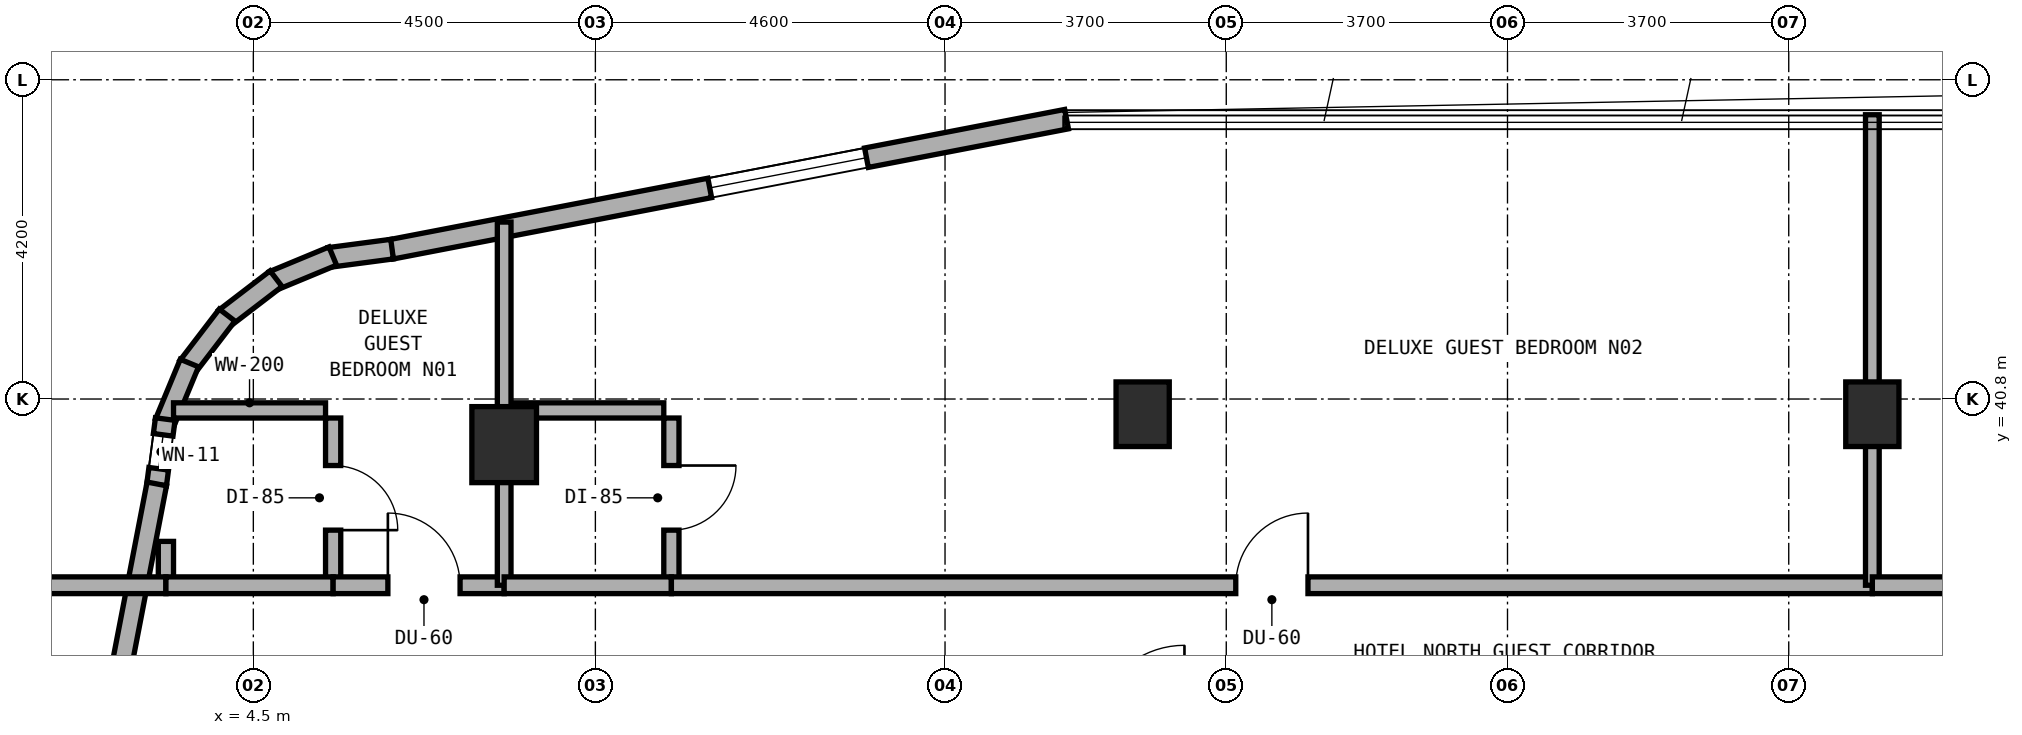
"""IFC4 building model, lengths in metres.
Left out: names, types, materials, properties, quantities, classifications, styles, units other than length and angle.
Written with IfcOpenShell. Run it as: python <this file> out.ifc"""

import sys

from ifc_helpers import new_model, si_unit, direction, frame, frame_2d, origin, origin_2d, place, context, subcontext, project, spatial, rectangle, extrude, element, fill, save


model = new_model("IFC4")
c1 = context("Model", 3, precision=1e-05, world=origin(), true_north=direction((0.0, 1.0)))
c2 = subcontext(c1, "Body", "Model", "MODEL_VIEW")
j1 = project(units=[si_unit("LENGTHUNIT", "METRE"), si_unit("PLANEANGLEUNIT", "RADIAN")], contexts=[c1])
p1 = place(None, origin())
s1 = spatial("IfcSite", under=j1, at=p1, CompositionType="ELEMENT")
p2 = place(p1, origin())
s2 = spatial("IfcBuilding", under=s1, at=p2, CompositionType="ELEMENT")
p3 = place(p2, frame((0.0, 0.0, 195.5)))
s3 = spatial("IfcBuildingStorey", under=s2, at=p3, CompositionType="ELEMENT", Elevation=195.5)
for number, where, z_axis, x_axis in (
    (1, (16.2, 40.6, 0.0), (0.0, 0.0, 1.0), (1.0, 0.0, 0.0)),
    (2, (25.8, 40.6, 0.0), (0.0, 0.0, 1.0), (1.0, 0.0, 0.0)),
):
    element("IfcColumn", number, at=place(p3, frame(where, z_axis=z_axis, x_axis=x_axis)), inside=s3, PredefinedType="COLUMN", context=c2, shape_type="SweptSolid", body=[
        extrude(rectangle(XDim=0.7, YDim=0.85, at=origin_2d()), origin(), (0.0, 0.0, 1.0), 3.6),
    ])
p4 = place(p3, frame((7.8, 40.2, 0.0), z_axis=(0.0, 0.0, 1.0), x_axis=(1.0, 0.0, 0.0)))
e3 = element("IfcColumn", 3, at=p4, inside=s3, PredefinedType="COLUMN", context=c2, shape_type="SweptSolid", body=[
    extrude(rectangle(XDim=0.85, YDim=1.0, at=origin_2d()), origin(), (0.0, 0.0, 1.0), 3.6),
])
p5 = place(p3, frame((15.199, 44.482, 0.0), z_axis=(0.0, 0.0, 1.0), x_axis=(-0.98192801022, -0.189254809039, 0.0)))
e4 = element("IfcWall", 4, at=p5, inside=s3, PredefinedType="STANDARD", context=c2, shape_type="SweptSolid", body=[
    extrude(rectangle(XDim=9.046, YDim=0.26, at=frame_2d((4.523, 0.0))), origin(), (0.0, 0.0, 1.0), 3.28),
])
p6 = place(p5, frame((2.681, 0.0, 0.85)))
e5 = element("IfcOpeningElement", 5, at=p6, cuts=e4, PredefinedType="OPENING", context=c2, shape_type="SweptSolid", body=[
    extrude(rectangle(XDim=2.1, YDim=1.5, at=frame_2d((1.05, 0.75))), frame((0.0, 0.14, 0.0), z_axis=(0.0, -1.0, 0.0), x_axis=(1.0, 0.0, 0.0)), (0.0, 0.0, 1.0), 0.28),
])
p7 = place(p3, frame((6.325, 42.772, 0.0), z_axis=(0.0, 0.0, 1.0), x_axis=(-0.99142134712, -0.130704676564, 0.0)))
e6 = element("IfcWall", 6, at=p7, inside=s3, PredefinedType="STANDARD", context=c2, shape_type="SweptSolid", body=[
    extrude(rectangle(XDim=0.833, YDim=0.26, at=frame_2d((0.417, 0.0))), origin(), (0.0, 0.0, 1.0), 3.28),
])
p8 = place(p3, frame((5.545, 42.681, 0.0), z_axis=(0.0, 0.0, 1.0), x_axis=(-0.923712395518, -0.383086687796, 0.0)))
e7 = element("IfcWall", 7, at=p8, inside=s3, PredefinedType="STANDARD", context=c2, shape_type="SweptSolid", body=[
    extrude(rectangle(XDim=0.851, YDim=0.26, at=frame_2d((0.425, 0.0))), origin(), (0.0, 0.0, 1.0), 3.28),
])
for number, where, z_axis, x_axis in (
    (8, (4.799, 42.383, 0.0), (0.0, 0.0, 1.0), (-0.794, -0.608, 0.0)),
    (9, (4.155, 41.904, 0.0), (0.0, 0.0, 1.0), (-0.608, -0.794, 0.0)),
):
    element("IfcWall", number, at=place(p3, frame(where, z_axis=z_axis, x_axis=x_axis)), inside=s3, PredefinedType="STANDARD", context=c2, shape_type="SweptSolid", body=[
        extrude(rectangle(XDim=0.85, YDim=0.26, at=frame_2d((0.425, 0.0))), origin(), (0.0, 0.0, 1.0), 3.28),
    ])
p9 = place(p3, frame((3.659, 41.273, 0.0), z_axis=(0.0, 0.0, 1.0), x_axis=(-0.383086687796, -0.923712395518, 0.0)))
e10 = element("IfcWall", 10, at=p9, inside=s3, PredefinedType="STANDARD", context=c2, shape_type="SweptSolid", body=[
    extrude(rectangle(XDim=0.851, YDim=0.26, at=frame_2d((0.425, 0.0))), origin(), (0.0, 0.0, 1.0), 3.28),
])
p10 = place(p3, frame((3.341, 40.536, 0.0), z_axis=(0.0, 0.0, 1.0), x_axis=(-0.130192647656, -0.991488716273, 0.0)))
e11 = element("IfcWall", 11, at=p10, inside=s3, PredefinedType="STANDARD", context=c2, shape_type="SweptSolid", body=[
    extrude(rectangle(XDim=0.868, YDim=0.26, at=frame_2d((0.434, 0.0))), origin(), (0.0, 0.0, 1.0), 3.28),
])
p11 = place(p10, frame((0.209, 0.0, 0.85)))
e12 = element("IfcOpeningElement", 12, at=p11, cuts=e11, PredefinedType="OPENING", context=c2, shape_type="SweptSolid", body=[
    extrude(rectangle(XDim=0.45, YDim=1.5, at=frame_2d((0.225, 0.75))), frame((0.0, 0.14, 0.0), z_axis=(0.0, -1.0, 0.0), x_axis=(1.0, 0.0, 0.0)), (0.0, 0.0, 1.0), 0.28),
])
p12 = place(p3, frame((3.23, 39.683, 0.0), z_axis=(0.0, 0.0, 1.0), x_axis=(-0.189254809039, -0.98192801022, 0.0)))
e13 = element("IfcWall", 13, at=p12, inside=s3, PredefinedType="STANDARD", context=c2, shape_type="SweptSolid", body=[
    extrude(rectangle(XDim=9.046, YDim=0.26, at=frame_2d((4.523, 0.0))), origin(), (0.0, 0.0, 1.0), 3.28),
])
p13 = place(p12, frame((4.212, 0.0, 0.85)))
e14 = element("IfcOpeningElement", 14, at=p13, cuts=e13, PredefinedType="OPENING", context=c2, shape_type="SweptSolid", body=[
    extrude(rectangle(XDim=2.1, YDim=1.5, at=frame_2d((1.05, 0.75))), frame((0.0, 0.14, 0.0), z_axis=(0.0, -1.0, 0.0), x_axis=(1.0, 0.0, 0.0)), (0.0, 0.0, 1.0), 0.28),
])
p14 = place(p3, frame((5.55, 38.45, 0.0), z_axis=(0.0, 0.0, 1.0), x_axis=(0.0, 1.0, 0.0)))
e15 = element("IfcWall", 15, at=p14, inside=s3, PredefinedType="PLUMBINGWALL", context=c2, shape_type="SweptSolid", body=[
    extrude(rectangle(XDim=2.1, YDim=0.2, at=frame_2d((1.05, 0.0))), origin(), (0.0, 0.0, 1.0), 3.28),
])
p15 = place(p14, frame((0.625, 0.0, 0.0)))
e16 = element("IfcOpeningElement", 16, at=p15, cuts=e15, PredefinedType="OPENING", context=c2, shape_type="SweptSolid", body=[
    extrude(rectangle(XDim=0.85, YDim=2.1, at=frame_2d((0.425, 1.05))), frame((0.0, 0.11, 0.0), z_axis=(0.0, -1.0, 0.0), x_axis=(1.0, 0.0, 0.0)), (0.0, 0.0, 1.0), 0.22),
])
p16 = place(p3, frame((3.45, 40.65, 0.0), z_axis=(0.0, 0.0, 1.0), x_axis=(1.0, 0.0, 0.0)))
e17 = element("IfcWall", 17, at=p16, inside=s3, PredefinedType="PLUMBINGWALL", context=c2, shape_type="SweptSolid", body=[
    extrude(rectangle(XDim=2.0, YDim=0.2, at=frame_2d((1.0, 0.0))), origin(), (0.0, 0.0, 1.0), 3.28),
])
p17 = place(p3, frame((3.35, 38.35, 0.0), z_axis=(0.0, 0.0, 1.0), x_axis=(0.0, 1.0, 0.0)))
e18 = element("IfcWall", 18, at=p17, inside=s3, PredefinedType="PLUMBINGWALL", context=c2, shape_type="SweptSolid", body=[
    extrude(rectangle(XDim=0.577, YDim=0.2, at=frame_2d((0.289, 0.0))), origin(), (0.0, 0.0, 1.0), 3.28),
])
p18 = place(p3, frame((1.56, 38.35, 0.0), z_axis=(0.0, 0.0, 1.0), x_axis=(1.0, 0.0, 0.0)))
e19 = element("IfcWall", 19, at=p18, inside=s3, PredefinedType="SOLIDWALL", context=c2, shape_type="SweptSolid", body=[
    extrude(rectangle(XDim=1.79, YDim=0.22, at=frame_2d((0.895, 0.0))), origin(), (0.0, 0.0, 1.0), 3.28),
])
p19 = place(p3, frame((3.35, 38.35, 0.0), z_axis=(0.0, 0.0, 1.0), x_axis=(1.0, 0.0, 0.0)))
e20 = element("IfcWall", 20, at=p19, inside=s3, PredefinedType="SOLIDWALL", context=c2, shape_type="SweptSolid", body=[
    extrude(rectangle(XDim=2.2, YDim=0.22, at=frame_2d((1.1, 0.0))), origin(), (0.0, 0.0, 1.0), 3.28),
])
p20 = place(p3, frame((5.55, 38.35, 0.0), z_axis=(0.0, 0.0, 1.0), x_axis=(1.0, 0.0, 0.0)))
e21 = element("IfcWall", 21, at=p20, inside=s3, PredefinedType="SOLIDWALL", context=c2, shape_type="SweptSolid", body=[
    extrude(rectangle(XDim=2.25, YDim=0.22, at=frame_2d((1.125, 0.0))), origin(), (0.0, 0.0, 1.0), 2.955),
])
p21 = place(p20, frame((0.72, 0.0, 0.0)))
e22 = element("IfcOpeningElement", 22, at=p21, cuts=e21, PredefinedType="OPENING", context=c2, shape_type="SweptSolid", body=[
    extrude(rectangle(XDim=0.95, YDim=2.1, at=frame_2d((0.475, 1.05))), frame((0.0, 0.12, 0.0), z_axis=(0.0, -1.0, 0.0), x_axis=(1.0, 0.0, 0.0)), (0.0, 0.0, 1.0), 0.24),
])
p22 = place(p3, frame((7.8, 38.35, 0.0), z_axis=(0.0, 0.0, 1.0), x_axis=(0.0, 1.0, 0.0)))
e23 = element("IfcWall", 23, at=p22, inside=s3, PredefinedType="SOLIDWALL", context=c2, shape_type="SweptSolid", body=[
    extrude(rectangle(XDim=4.778, YDim=0.18, at=frame_2d((2.389, 0.0))), origin(), (0.0, 0.0, 1.0), 2.895),
])
p23 = place(p3, frame((10.0, 38.45, 0.0), z_axis=(0.0, 0.0, 1.0), x_axis=(0.0, 1.0, 0.0)))
e24 = element("IfcWall", 24, at=p23, inside=s3, PredefinedType="PLUMBINGWALL", context=c2, shape_type="SweptSolid", body=[
    extrude(rectangle(XDim=2.1, YDim=0.2, at=frame_2d((1.05, 0.0))), origin(), (0.0, 0.0, 1.0), 2.895),
])
p24 = place(p23, frame((0.625, 0.0, 0.0)))
e25 = element("IfcOpeningElement", 25, at=p24, cuts=e24, PredefinedType="OPENING", context=c2, shape_type="SweptSolid", body=[
    extrude(rectangle(XDim=0.85, YDim=2.1, at=frame_2d((0.425, 1.05))), frame((0.0, 0.11, 0.0), z_axis=(0.0, -1.0, 0.0), x_axis=(1.0, 0.0, 0.0)), (0.0, 0.0, 1.0), 0.22),
])
p25 = place(p3, frame((7.9, 40.65, 0.0), z_axis=(0.0, 0.0, 1.0), x_axis=(1.0, 0.0, 0.0)))
e26 = element("IfcWall", 26, at=p25, inside=s3, PredefinedType="PLUMBINGWALL", context=c2, shape_type="SweptSolid", body=[
    extrude(rectangle(XDim=2.0, YDim=0.2, at=frame_2d((1.0, 0.0))), origin(), (0.0, 0.0, 1.0), 3.28),
])
p26 = place(p3, frame((7.8, 38.35, 0.0), z_axis=(0.0, 0.0, 1.0), x_axis=(1.0, 0.0, 0.0)))
e27 = element("IfcWall", 27, at=p26, inside=s3, PredefinedType="SOLIDWALL", context=c2, shape_type="SweptSolid", body=[
    extrude(rectangle(XDim=2.2, YDim=0.22, at=frame_2d((1.1, 0.0))), origin(), (0.0, 0.0, 1.0), 2.955),
])
p27 = place(p3, frame((10.0, 38.35, 0.0), z_axis=(0.0, 0.0, 1.0), x_axis=(1.0, 0.0, 0.0)))
e28 = element("IfcWall", 28, at=p27, inside=s3, PredefinedType="SOLIDWALL", context=c2, shape_type="SweptSolid", body=[
    extrude(rectangle(XDim=15.8, YDim=0.22, at=frame_2d((7.9, 0.0))), origin(), (0.0, 0.0, 1.0), 2.955),
])
p28 = place(p27, frame((7.425, 0.0, 0.0)))
e29 = element("IfcOpeningElement", 29, at=p28, cuts=e28, PredefinedType="OPENING", context=c2, shape_type="SweptSolid", body=[
    extrude(rectangle(XDim=0.95, YDim=2.1, at=frame_2d((0.475, 1.05))), frame((0.0, 0.12, 0.0), z_axis=(0.0, -1.0, 0.0), x_axis=(1.0, 0.0, 0.0)), (0.0, 0.0, 1.0), 0.24),
])
p29 = place(p3, frame((25.8, 38.35, 0.0), z_axis=(0.0, 0.0, 1.0), x_axis=(0.0, 1.0, 0.0)))
e30 = element("IfcWall", 30, at=p29, inside=s3, PredefinedType="SOLIDWALL", context=c2, shape_type="SweptSolid", body=[
    extrude(rectangle(XDim=6.19, YDim=0.18, at=frame_2d((3.095, 0.0))), origin(), (0.0, 0.0, 1.0), 2.895),
])
p30 = place(p3, frame((25.8, 38.35, 0.0), z_axis=(0.0, 0.0, 1.0), x_axis=(1.0, 0.0, 0.0)))
e31 = element("IfcWall", 31, at=p30, inside=s3, PredefinedType="SOLIDWALL", context=c2, shape_type="SweptSolid", body=[
    extrude(rectangle(XDim=10.65, YDim=0.22, at=frame_2d((5.325, 0.0))), origin(), (0.0, 0.0, 1.0), 2.895),
])
p31 = place(p30, frame((4.85, 0.0, 0.0)))
e32 = element("IfcOpeningElement", 32, at=p31, cuts=e31, PredefinedType="OPENING", context=c2, shape_type="SweptSolid", body=[
    extrude(rectangle(XDim=0.95, YDim=2.1, at=frame_2d((0.475, 1.05))), frame((0.0, 0.12, 0.0), z_axis=(0.0, -1.0, 0.0), x_axis=(1.0, 0.0, 0.0)), (0.0, 0.0, 1.0), 0.24),
])
p32 = place(p6, origin())
e33 = element("IfcWindow", 33, at=p32, inside=s3, PartitioningType="SINGLE_PANEL", PredefinedType="WINDOW", context=c2, shape_type="SweptSolid", body=[
    extrude(rectangle(XDim=2.1, YDim=1.5, at=frame_2d((1.05, 0.75))), frame((0.0, 0.03, 0.0), z_axis=(0.0, -1.0, 0.0), x_axis=(1.0, 0.0, 0.0)), (0.0, 0.0, 1.0), 0.06),
])
fill(e5, e33)
p33 = place(p11, origin())
e34 = element("IfcWindow", 34, at=p33, inside=s3, PartitioningType="SINGLE_PANEL", PredefinedType="WINDOW", context=c2, shape_type="SweptSolid", body=[
    extrude(rectangle(XDim=0.45, YDim=1.5, at=frame_2d((0.225, 0.75))), frame((0.0, 0.03, 0.0), z_axis=(0.0, -1.0, 0.0), x_axis=(1.0, 0.0, 0.0)), (0.0, 0.0, 1.0), 0.06),
])
fill(e12, e34)
p34 = place(p15, frame((0.85, 0.0, 0.0), z_axis=(0.0, 0.0, 1.0), x_axis=(-1.0, 0.0, 0.0)))
e35 = element("IfcDoor", 35, at=p34, inside=s3, OperationType="SINGLE_SWING_RIGHT", PredefinedType="DOOR", context=c2, shape_type="SweptSolid", body=[
    extrude(rectangle(XDim=0.85, YDim=2.1, at=frame_2d((0.425, 1.05))), frame((0.0, 0.025, 0.0), z_axis=(0.0, -1.0, 0.0), x_axis=(1.0, 0.0, 0.0)), (0.0, 0.0, 1.0), 0.05),
])
fill(e16, e35)
p35 = place(p21, origin())
e36 = element("IfcDoor", 36, at=p35, inside=s3, OperationType="SINGLE_SWING_LEFT", PredefinedType="DOOR", context=c2, shape_type="SweptSolid", body=[
    extrude(rectangle(XDim=0.95, YDim=2.1, at=frame_2d((0.475, 1.05))), frame((0.0, 0.025, 0.0), z_axis=(0.0, -1.0, 0.0), x_axis=(1.0, 0.0, 0.0)), (0.0, 0.0, 1.0), 0.05),
])
fill(e22, e36)
p36 = place(p24, frame((0.85, 0.0, 0.0), z_axis=(0.0, 0.0, 1.0), x_axis=(-1.0, 0.0, 0.0)))
e37 = element("IfcDoor", 37, at=p36, inside=s3, OperationType="SINGLE_SWING_LEFT", PredefinedType="DOOR", context=c2, shape_type="SweptSolid", body=[
    extrude(rectangle(XDim=0.85, YDim=2.1, at=frame_2d((0.425, 1.05))), frame((0.0, 0.025, 0.0), z_axis=(0.0, -1.0, 0.0), x_axis=(1.0, 0.0, 0.0)), (0.0, 0.0, 1.0), 0.05),
])
fill(e25, e37)
p37 = place(p28, origin())
e38 = element("IfcDoor", 38, at=p37, inside=s3, OperationType="SINGLE_SWING_RIGHT", PredefinedType="DOOR", context=c2, shape_type="SweptSolid", body=[
    extrude(rectangle(XDim=0.95, YDim=2.1, at=frame_2d((0.475, 1.05))), frame((0.0, 0.025, 0.0), z_axis=(0.0, -1.0, 0.0), x_axis=(1.0, 0.0, 0.0)), (0.0, 0.0, 1.0), 0.05),
])
fill(e29, e38)
save(model, sys.argv[1])
